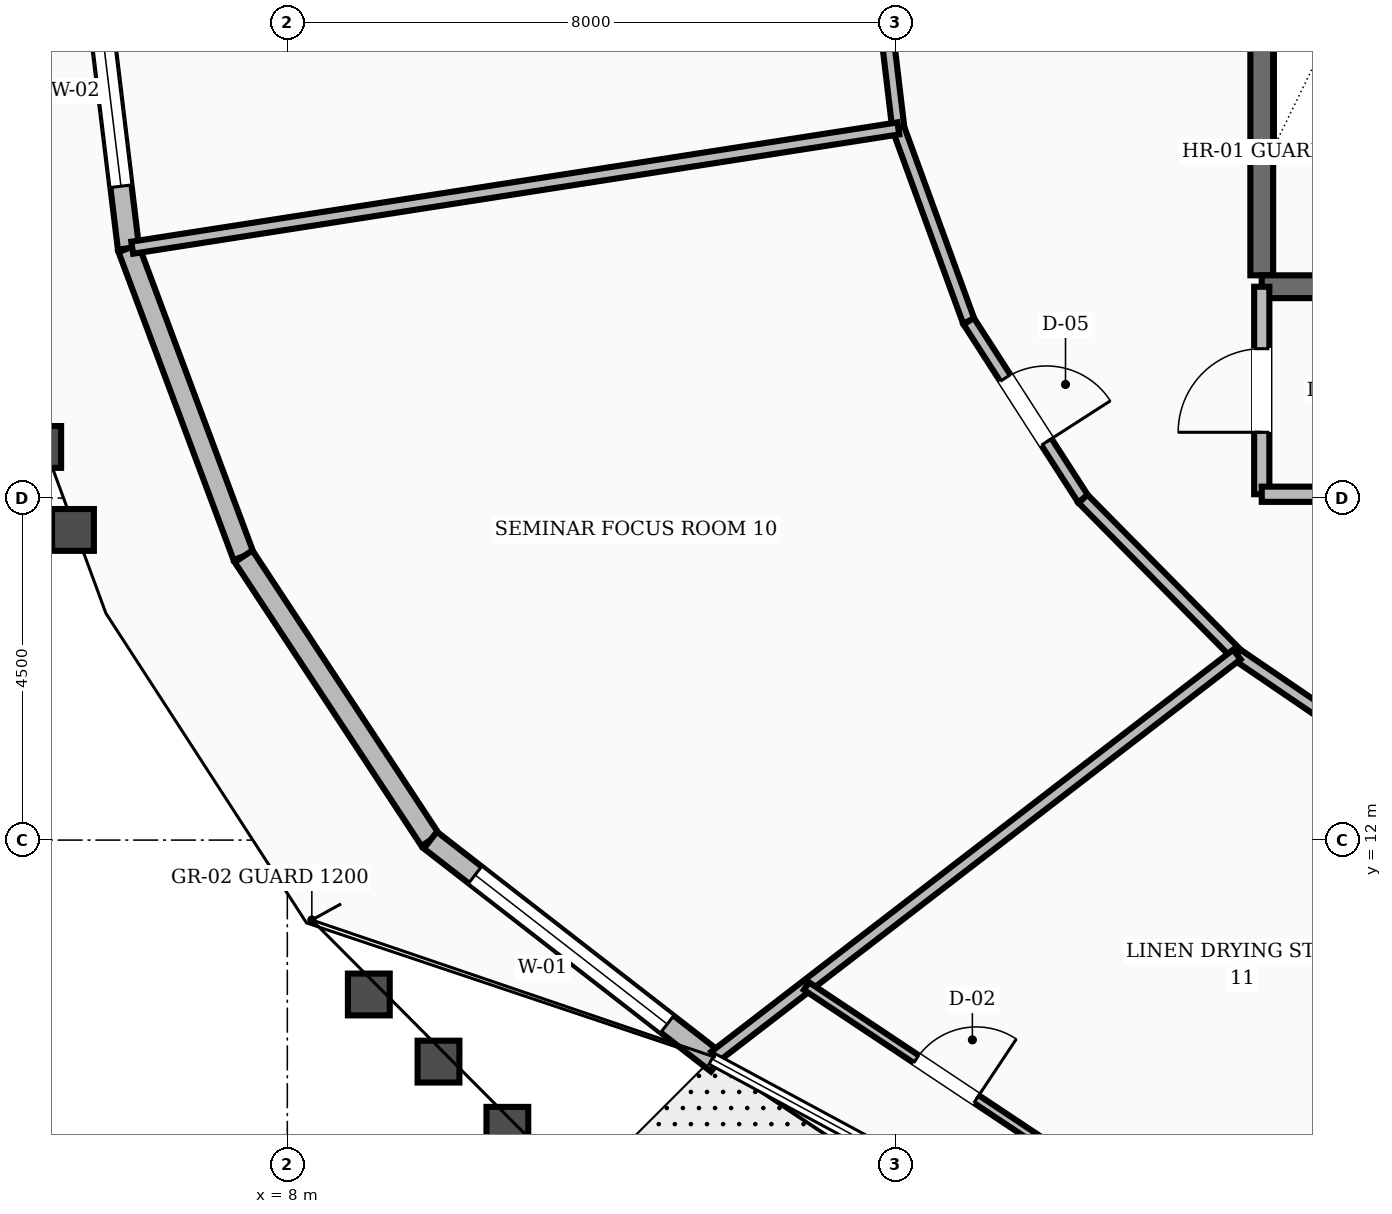
"""IFC4 building model, lengths in metres.
Left out: names, types, materials, properties, quantities, classifications, styles, units other than length and angle.
Written with IfcOpenShell. Run it as: python <this file> out.ifc"""

import sys

from ifc_helpers import new_model, si_unit, direction, frame, frame_2d, origin, place, context, subcontext, project, spatial, rectangle, extrude, element, fill, save


model = new_model("IFC4")
c1 = context("Model", 3, precision=1e-05, world=origin(), true_north=direction((0.0, 1.0)))
c2 = subcontext(c1, "Body", "Model", "MODEL_VIEW")
j1 = project(units=[si_unit("LENGTHUNIT", "METRE"), si_unit("PLANEANGLEUNIT", "RADIAN")], contexts=[c1])
p1 = place(None, origin())
s1 = spatial("IfcSite", under=j1, at=p1, CompositionType="ELEMENT")
p2 = place(p1, origin())
s2 = spatial("IfcBuilding", under=s1, at=p2, CompositionType="ELEMENT")
p3 = place(p2, frame((0.0, 0.0, 55.6)))
s3 = spatial("IfcBuildingStorey", under=s2, at=p3, CompositionType="ELEMENT", Elevation=55.6)
p4 = place(p3, frame((20.82, 19.43, 0.0), z_axis=(0.0, 0.0, 1.0), x_axis=(0.0, 1.0, 0.0)))
e1 = element("IfcWall", 1, at=p4, inside=s3, PredefinedType="SHEAR", context=c2, shape_type="SweptSolid", body=[
    extrude(rectangle(XDim=8.74, YDim=0.3, at=frame_2d((4.37, 0.0))), origin(), (0.0, 0.0, 1.0), 3.6),
])
p5 = place(p3, frame((20.82, 19.28, 0.0), z_axis=(0.0, 0.0, 1.0), x_axis=(1.0, 0.0, 0.0)))
e2 = element("IfcWall", 2, at=p5, inside=s3, PredefinedType="SHEAR", context=c2, shape_type="SweptSolid", body=[
    extrude(rectangle(XDim=3.6, YDim=0.3, at=frame_2d((1.8, 0.0))), origin(), (0.0, 0.0, 1.0), 3.6),
])
p6 = place(p5, frame((1.3, 0.0, 0.0)))
e3 = element("IfcOpeningElement", 3, at=p6, cuts=e2, PredefinedType="OPENING", context=c2, shape_type="SweptSolid", body=[
    extrude(rectangle(XDim=1.1, YDim=2.1, at=frame_2d((0.55, 1.05))), frame((0.0, 0.16, 0.0), z_axis=(0.0, -1.0, 0.0), x_axis=(1.0, 0.0, 0.0)), (0.0, 0.0, 1.0), 0.32),
])
p7 = place(p3, frame((5.399, 24.0, 0.0), z_axis=(0.0, 0.0, 1.0), x_axis=(0.120374306833, -0.992728576326, 0.0)))
e4 = element("IfcWall", 4, at=p7, inside=s3, PredefinedType="STANDARD", context=c2, shape_type="SweptSolid", body=[
    extrude(rectangle(XDim=4.245, YDim=0.28, at=frame_2d((2.123, 0.0))), origin(), (0.0, 0.0, 1.0), 2.65),
])
p8 = place(p7, frame((0.823, 0.0, 0.8)))
e5 = element("IfcOpeningElement", 5, at=p8, cuts=e4, PredefinedType="OPENING", context=c2, shape_type="SweptSolid", body=[
    extrude(rectangle(XDim=2.6, YDim=1.65, at=frame_2d((1.3, 0.825))), frame((0.0, 0.15, 0.0), z_axis=(0.0, -1.0, 0.0), x_axis=(1.0, 0.0, 0.0)), (0.0, 0.0, 1.0), 0.3),
])
p9 = place(p3, frame((5.91, 19.786, 0.0), z_axis=(0.0, 0.0, 1.0), x_axis=(0.349991270329, -0.936752961401, 0.0)))
e6 = element("IfcWall", 6, at=p9, inside=s3, PredefinedType="STANDARD", context=c2, shape_type="SweptSolid", body=[
    extrude(rectangle(XDim=4.326, YDim=0.28, at=frame_2d((2.163, 0.0))), origin(), (0.0, 0.0, 1.0), 2.65),
])
p10 = place(p3, frame((7.424, 15.734, 0.0), z_axis=(0.0, 0.0, 1.0), x_axis=(0.549775955505, -0.835312156471, 0.0)))
e7 = element("IfcWall", 7, at=p10, inside=s3, PredefinedType="STANDARD", context=c2, shape_type="SweptSolid", body=[
    extrude(rectangle(XDim=4.471, YDim=0.28, at=frame_2d((2.235, 0.0))), origin(), (0.0, 0.0, 1.0), 2.65),
])
p11 = place(p3, frame((9.882, 11.999, 0.0), z_axis=(0.0, 0.0, 1.0), x_axis=(0.789753385281, -0.613424478186, 0.0)))
e8 = element("IfcWall", 8, at=p11, inside=s3, PredefinedType="STANDARD", context=c2, shape_type="SweptSolid", body=[
    extrude(rectangle(XDim=4.782, YDim=0.28, at=frame_2d((2.391, 0.0))), origin(), (0.0, 0.0, 1.0), 2.65),
])
p12 = place(p11, frame((0.745, 0.0, 0.8)))
e9 = element("IfcOpeningElement", 9, at=p12, cuts=e8, PredefinedType="OPENING", context=c2, shape_type="SweptSolid", body=[
    extrude(rectangle(XDim=3.2, YDim=1.65, at=frame_2d((1.6, 0.825))), frame((0.0, 0.15, 0.0), z_axis=(0.0, -1.0, 0.0), x_axis=(1.0, 0.0, 0.0)), (0.0, 0.0, 1.0), 0.3),
])
p13 = place(p3, frame((20.82, 16.55, 0.0), z_axis=(0.0, 0.0, 1.0), x_axis=(0.0, 1.0, 0.0)))
e10 = element("IfcWall", 10, at=p13, inside=s3, PredefinedType="SOLIDWALL", context=c2, shape_type="SweptSolid", body=[
    extrude(rectangle(XDim=2.73, YDim=0.2, at=frame_2d((1.365, 0.0))), origin(), (0.0, 0.0, 1.0), 2.61),
])
p14 = place(p13, frame((0.815, 0.0, 0.0)))
e11 = element("IfcOpeningElement", 11, at=p14, cuts=e10, PredefinedType="OPENING", context=c2, shape_type="SweptSolid", body=[
    extrude(rectangle(XDim=1.1, YDim=2.1, at=frame_2d((0.55, 1.05))), frame((0.0, 0.11, 0.0), z_axis=(0.0, -1.0, 0.0), x_axis=(1.0, 0.0, 0.0)), (0.0, 0.0, 1.0), 0.22),
])
p15 = place(p3, frame((20.82, 16.55, 0.0), z_axis=(0.0, 0.0, 1.0), x_axis=(1.0, 0.0, 0.0)))
e12 = element("IfcWall", 12, at=p15, inside=s3, PredefinedType="SOLIDWALL", context=c2, shape_type="SweptSolid", body=[
    extrude(rectangle(XDim=3.98, YDim=0.2, at=frame_2d((1.99, 0.0))), origin(), (0.0, 0.0, 1.0), 2.61),
])
p16 = place(p3, frame((15.726, 24.0, 0.0), z_axis=(0.0, 0.0, 1.0), x_axis=(0.117763961213, -0.99304161516, 0.0)))
e13 = element("IfcWall", 13, at=p16, inside=s3, PredefinedType="SOLIDWALL", context=c2, shape_type="SweptSolid", body=[
    extrude(rectangle(XDim=2.656, YDim=0.16, at=frame_2d((1.328, 0.0))), origin(), (0.0, 0.0, 1.0), 2.61),
])
p17 = place(p3, frame((16.039, 21.363, 0.0), z_axis=(0.0, 0.0, 1.0), x_axis=(0.343013437329, -0.939330496583, 0.0)))
e14 = element("IfcWall", 14, at=p17, inside=s3, PredefinedType="SOLIDWALL", context=c2, shape_type="SweptSolid", body=[
    extrude(rectangle(XDim=2.7, YDim=0.16, at=frame_2d((1.35, 0.0))), origin(), (0.0, 0.0, 1.0), 2.61),
])
p18 = place(p3, frame((16.965, 18.827, 0.0), z_axis=(0.0, 0.0, 1.0), x_axis=(0.541126045017, -0.840941498206, 0.0)))
e15 = element("IfcWall", 15, at=p18, inside=s3, PredefinedType="SOLIDWALL", context=c2, shape_type="SweptSolid", body=[
    extrude(rectangle(XDim=2.779, YDim=0.16, at=frame_2d((1.39, 0.0))), origin(), (0.0, 0.0, 1.0), 2.61),
])
p19 = place(p18, frame((0.89, 0.0, 0.0)))
e16 = element("IfcOpeningElement", 16, at=p19, cuts=e15, PredefinedType="OPENING", context=c2, shape_type="SweptSolid", body=[
    extrude(rectangle(XDim=1.0, YDim=2.1, at=frame_2d((0.5, 1.05))), frame((0.0, 0.09, 0.0), z_axis=(0.0, -1.0, 0.0), x_axis=(1.0, 0.0, 0.0)), (0.0, 0.0, 1.0), 0.18),
])
p20 = place(p3, frame((18.469, 16.49, 0.0), z_axis=(0.0, 0.0, 1.0), x_axis=(0.702811997, -0.711375636969, 0.0)))
e17 = element("IfcWall", 17, at=p20, inside=s3, PredefinedType="SOLIDWALL", context=c2, shape_type="SweptSolid", body=[
    extrude(rectangle(XDim=2.879, YDim=0.16, at=frame_2d((1.44, 0.0))), origin(), (0.0, 0.0, 1.0), 2.61),
])
p21 = place(p3, frame((20.492, 14.441, 0.0), z_axis=(0.0, 0.0, 1.0), x_axis=(0.826293096206, -0.56324037423, 0.0)))
e18 = element("IfcWall", 18, at=p21, inside=s3, PredefinedType="SOLIDWALL", context=c2, shape_type="SweptSolid", body=[
    extrude(rectangle(XDim=2.985, YDim=0.16, at=frame_2d((1.492, 0.0))), origin(), (0.0, 0.0, 1.0), 2.61),
])
p22 = place(p3, frame((16.039, 21.363, 0.0), z_axis=(0.0, 0.0, 1.0), x_axis=(-0.988098124705, -0.153824887305, 0.0)))
e19 = element("IfcWall", 19, at=p22, inside=s3, PredefinedType="SOLIDWALL", context=c2, shape_type="SweptSolid", body=[
    extrude(rectangle(XDim=10.2, YDim=0.16, at=frame_2d((5.1, 0.0))), origin(), (0.0, 0.0, 1.0), 2.61),
])
p23 = place(p3, frame((20.492, 14.441, 0.0), z_axis=(0.0, 0.0, 1.0), x_axis=(-0.792237430117, -0.610212958173, 0.0)))
e20 = element("IfcWall", 20, at=p23, inside=s3, PredefinedType="SOLIDWALL", context=c2, shape_type="SweptSolid", body=[
    extrude(rectangle(XDim=8.667, YDim=0.16, at=frame_2d((4.333, 0.0))), origin(), (0.0, 0.0, 1.0), 2.61),
])
p24 = place(p3, frame((14.83, 10.08, 0.0), z_axis=(0.0, 0.0, 1.0), x_axis=(0.832534364436, -0.553973403724, 0.0)))
e21 = element("IfcWall", 21, at=p24, inside=s3, PredefinedType="PARTITIONING", context=c2, shape_type="SweptSolid", body=[
    extrude(rectangle(XDim=4.42, YDim=0.12, at=frame_2d((2.21, 0.0))), origin(), (0.0, 0.0, 1.0), 2.61),
])
p25 = place(p24, frame((1.735, 0.0, 0.0)))
e22 = element("IfcOpeningElement", 22, at=p25, cuts=e21, PredefinedType="OPENING", context=c2, shape_type="SweptSolid", body=[
    extrude(rectangle(XDim=0.95, YDim=2.1, at=frame_2d((0.475, 1.05))), frame((0.0, 0.07, 0.0), z_axis=(0.0, -1.0, 0.0), x_axis=(1.0, 0.0, 0.0)), (0.0, 0.0, 1.0), 0.14),
])
p26 = place(p8, origin())
e23 = element("IfcWindow", 23, at=p26, inside=s3, PartitioningType="SINGLE_PANEL", PredefinedType="WINDOW", context=c2, shape_type="SweptSolid", body=[
    extrude(rectangle(XDim=2.6, YDim=1.65, at=frame_2d((1.3, 0.825))), frame((0.0, 0.03, 0.0), z_axis=(0.0, -1.0, 0.0), x_axis=(1.0, 0.0, 0.0)), (0.0, 0.0, 1.0), 0.06),
])
fill(e5, e23)
p27 = place(p12, origin())
e24 = element("IfcWindow", 24, at=p27, inside=s3, PartitioningType="SINGLE_PANEL", PredefinedType="WINDOW", context=c2, shape_type="SweptSolid", body=[
    extrude(rectangle(XDim=3.2, YDim=1.65, at=frame_2d((1.6, 0.825))), frame((0.0, 0.03, 0.0), z_axis=(0.0, -1.0, 0.0), x_axis=(1.0, 0.0, 0.0)), (0.0, 0.0, 1.0), 0.06),
])
fill(e9, e24)
p28 = place(p14, origin())
e25 = element("IfcDoor", 25, at=p28, inside=s3, OperationType="SINGLE_SWING_LEFT", PredefinedType="DOOR", context=c2, shape_type="SweptSolid", body=[
    extrude(rectangle(XDim=1.1, YDim=2.1, at=frame_2d((0.55, 1.05))), frame((0.0, 0.025, 0.0), z_axis=(0.0, -1.0, 0.0), x_axis=(1.0, 0.0, 0.0)), (0.0, 0.0, 1.0), 0.05),
])
fill(e11, e25)
p29 = place(p19, origin())
e26 = element("IfcDoor", 26, at=p29, inside=s3, OperationType="SINGLE_SWING_RIGHT", PredefinedType="DOOR", context=c2, shape_type="SweptSolid", body=[
    extrude(rectangle(XDim=1.0, YDim=2.1, at=frame_2d((0.5, 1.05))), frame((0.0, 0.025, 0.0), z_axis=(0.0, -1.0, 0.0), x_axis=(1.0, 0.0, 0.0)), (0.0, 0.0, 1.0), 0.05),
])
fill(e16, e26)
p30 = place(p25, origin())
e27 = element("IfcDoor", 27, at=p30, inside=s3, OperationType="SINGLE_SWING_RIGHT", PredefinedType="DOOR", context=c2, shape_type="SweptSolid", body=[
    extrude(rectangle(XDim=0.95, YDim=2.1, at=frame_2d((0.475, 1.05))), frame((0.0, 0.025, 0.0), z_axis=(0.0, -1.0, 0.0), x_axis=(1.0, 0.0, 0.0)), (0.0, 0.0, 1.0), 0.05),
])
fill(e22, e27)
save(model, sys.argv[1])
